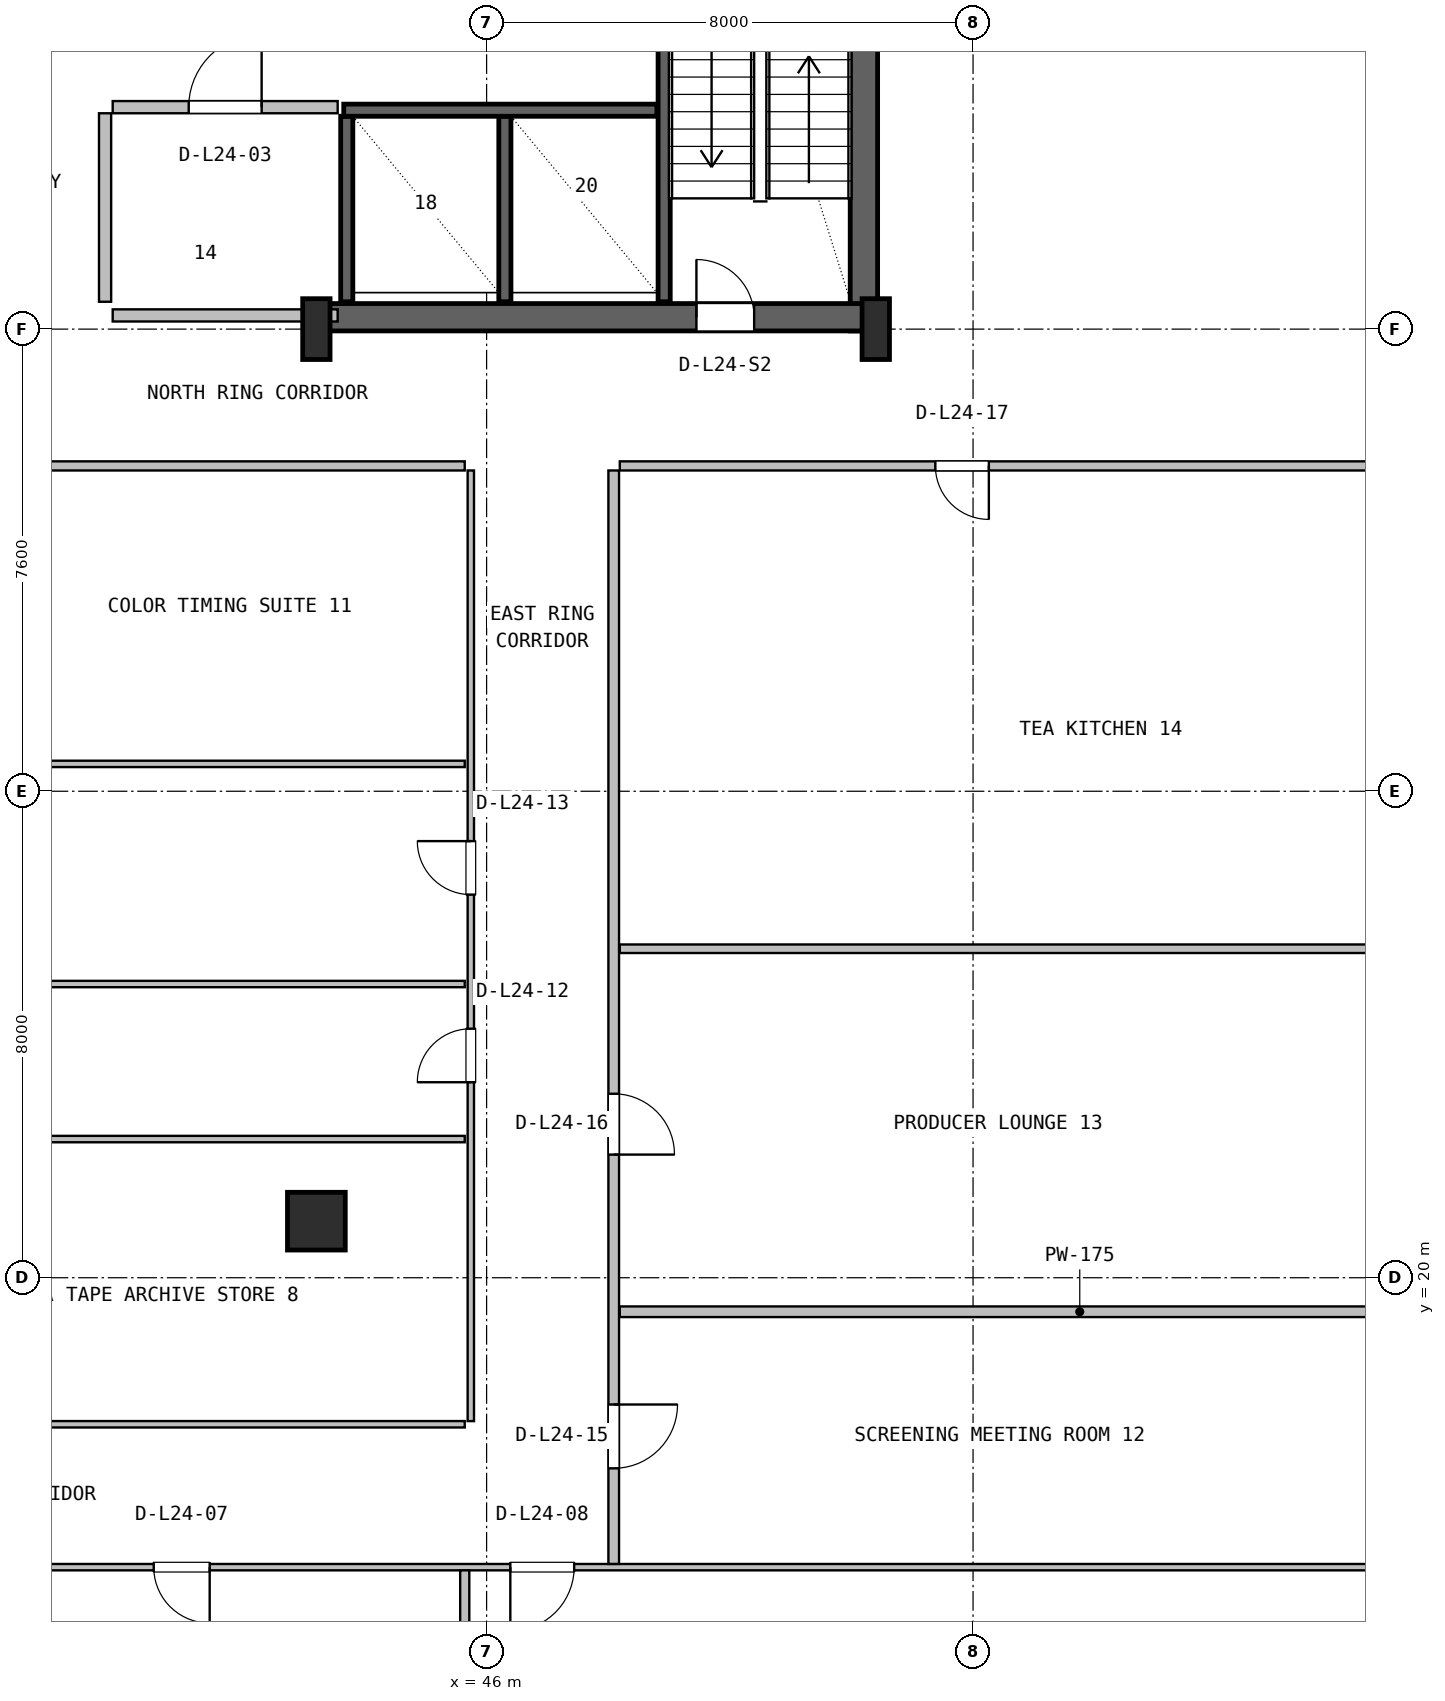
"""IFC4 building model, lengths in metres.
Left out: names, types, materials, properties, quantities, classifications, styles, units other than length and angle.
Written with IfcOpenShell. Run it as: python <this file> out.ifc"""

import sys

from ifc_helpers import new_model, si_unit, direction, frame, frame_2d, origin, origin_2d, place, context, subcontext, project, spatial, rectangle, i_section, extrude, source, transform, mapped, element, fill, save


model = new_model("IFC4")
c1 = context("Model", 3, precision=1e-05, world=origin(), true_north=direction((0.0, 1.0)))
c2 = subcontext(c1, "Body", "Model", "MODEL_VIEW")
j1 = project(units=[si_unit("LENGTHUNIT", "METRE"), si_unit("PLANEANGLEUNIT", "RADIAN")], contexts=[c1])
p1 = place(None, origin())
s1 = spatial("IfcSite", under=j1, at=p1, CompositionType="ELEMENT")
p2 = place(p1, origin())
s2 = spatial("IfcBuilding", under=s1, at=p2, CompositionType="ELEMENT")
p3 = place(p2, frame((0.0, 0.0, 103.0)))
s3 = spatial("IfcBuildingStorey", under=s2, at=p3, CompositionType="ELEMENT", Elevation=103.0)
p4 = place(p3, frame((52.205, 35.57, 0.0), z_axis=(0.0, 0.0, 1.0), x_axis=(0.0, 1.0, 0.0)))
e1 = element("IfcWall", 1, at=p4, inside=s3, PredefinedType="SHEAR", context=c2, shape_type="SweptSolid", body=[
    extrude(rectangle(XDim=11.23, YDim=0.45, at=frame_2d((5.615, 0.0))), origin(), (0.0, 0.0, 1.0), 3.55),
])
p5 = place(p3, frame((43.2, 35.795, 0.0), z_axis=(0.0, 0.0, 1.0), x_axis=(1.0, 0.0, 0.0)))
e2 = element("IfcWall", 2, at=p5, inside=s3, PredefinedType="SHEAR", context=c2, shape_type="SweptSolid", body=[
    extrude(rectangle(XDim=9.23, YDim=0.45, at=frame_2d((4.615, 0.0))), origin(), (0.0, 0.0, 1.0), 3.55),
])
p6 = place(p5, frame((6.25, 0.0, 0.0)))
e3 = element("IfcOpeningElement", 3, at=p6, cuts=e2, PredefinedType="OPENING", context=c2, shape_type="SweptSolid", body=[
    extrude(rectangle(XDim=0.95, YDim=2.1, at=frame_2d((0.475, 1.05))), frame((0.0, 0.235, 0.0), z_axis=(0.0, -1.0, 0.0), x_axis=(1.0, 0.0, 0.0)), (0.0, 0.0, 1.0), 0.47),
])
m1 = source(origin(), c2, "Body", "SweptSolid", [
    extrude(i_section(OverallWidth=0.45, OverallDepth=1.0, WebThickness=0.016, FlangeThickness=0.03, FilletRadius=0.016, at=origin_2d()), origin(), (0.0, 0.0, 1.0), 3.8),
])
for number, where, z_axis, x_axis in (
    (4, (43.2, 35.6, 0.0), (0.0, 0.0, 1.0), (1.0, 0.0, 0.0)),
    (5, (52.4, 35.6, 0.0), (0.0, 0.0, 1.0), (1.0, 0.0, 0.0)),
):
    element("IfcColumn", number, at=place(p3, frame(where, z_axis=z_axis, x_axis=x_axis)), inside=s3, PredefinedType="COLUMN", context=c2, shape_type="MappedRepresentation", body=[
        mapped(m1, transform((0.0, 0.0, 0.0), x_axis=(1.0, 0.0, 0.0), y_axis=(0.0, 1.0, 0.0), z_axis=(0.0, 0.0, 1.0), scale=1.0)),
    ])
m2 = source(origin(), c2, "Body", "SweptSolid", [
    extrude(rectangle(XDim=0.95, YDim=0.95, at=origin_2d()), origin(), (0.0, 0.0, 1.0), 3.8),
])
p7 = place(p3, frame((43.2, 20.93, 0.0), z_axis=(0.0, 0.0, 1.0), x_axis=(1.0, 0.0, 0.0)))
e6 = element("IfcColumn", 6, at=p7, inside=s3, PredefinedType="COLUMN", context=c2, shape_type="MappedRepresentation", body=[
    mapped(m2, transform((0.0, 0.0, 0.0), x_axis=(1.0, 0.0, 0.0), y_axis=(0.0, 1.0, 0.0), z_axis=(0.0, 0.0, 1.0), scale=1.0)),
])
p8 = place(p3, frame((48.92, 36.05, 0.0), z_axis=(0.0, 0.0, 1.0), x_axis=(0.0, 1.0, 0.0)))
e7 = element("IfcWall", 7, at=p8, inside=s3, PredefinedType="SHEAR", context=c2, shape_type="SweptSolid", body=[
    extrude(rectangle(XDim=10.5, YDim=0.2, at=frame_2d((5.25, 0.0))), origin(), (0.0, 0.0, 1.0), 3.55),
])
for number, where, z_axis, x_axis in (
    (8, (43.7, 36.05, 0.0), (0.0, 0.0, 1.0), (0.0, 1.0, 0.0)),
    (9, (46.3, 36.05, 0.0), (0.0, 0.0, 1.0), (0.0, 1.0, 0.0)),
):
    element("IfcWall", number, at=place(p3, frame(where, z_axis=z_axis, x_axis=x_axis)), inside=s3, PredefinedType="SHEAR", context=c2, shape_type="SweptSolid", body=[
        extrude(rectangle(XDim=3.05, YDim=0.2, at=frame_2d((1.525, 0.0))), origin(), (0.0, 0.0, 1.0), 3.55),
    ])
p9 = place(p3, frame((43.65, 39.2, 0.0), z_axis=(0.0, 0.0, 1.0), x_axis=(1.0, 0.0, 0.0)))
e10 = element("IfcWall", 10, at=p9, inside=s3, PredefinedType="SHEAR", context=c2, shape_type="SweptSolid", body=[
    extrude(rectangle(XDim=5.15, YDim=0.2, at=frame_2d((2.575, 0.0))), origin(), (0.0, 0.0, 1.0), 3.55),
])
p10 = place(p3, frame((39.85, 35.825, 0.0), z_axis=(0.0, 0.0, 1.0), x_axis=(1.0, 0.0, 0.0)))
e11 = element("IfcWall", 11, at=p10, inside=s3, PredefinedType="SOLIDWALL", context=c2, shape_type="SweptSolid", body=[
    extrude(rectangle(XDim=3.7, YDim=0.2, at=frame_2d((1.85, 0.0))), origin(), (0.0, 0.0, 1.0), 2.325),
])
p11 = place(p3, frame((39.85, 39.25, 0.0), z_axis=(0.0, 0.0, 1.0), x_axis=(1.0, 0.0, 0.0)))
e12 = element("IfcWall", 12, at=p11, inside=s3, PredefinedType="SOLIDWALL", context=c2, shape_type="SweptSolid", body=[
    extrude(rectangle(XDim=3.7, YDim=0.2, at=frame_2d((1.85, 0.0))), origin(), (0.0, 0.0, 1.0), 3.53),
])
p12 = place(p11, frame((1.25, 0.0, 0.0)))
e13 = element("IfcOpeningElement", 13, at=p12, cuts=e12, PredefinedType="OPENING", context=c2, shape_type="SweptSolid", body=[
    extrude(rectangle(XDim=1.2, YDim=2.1, at=frame_2d((0.6, 1.05))), frame((0.0, 0.11, 0.0), z_axis=(0.0, -1.0, 0.0), x_axis=(1.0, 0.0, 0.0)), (0.0, 0.0, 1.0), 0.22),
])
p13 = place(p3, frame((39.725, 36.05, 0.0), z_axis=(0.0, 0.0, 1.0), x_axis=(0.0, 1.0, 0.0)))
e14 = element("IfcWall", 14, at=p13, inside=s3, PredefinedType="SOLIDWALL", context=c2, shape_type="SweptSolid", body=[
    extrude(rectangle(XDim=3.1, YDim=0.2, at=frame_2d((1.55, 0.0))), origin(), (0.0, 0.0, 1.0), 3.53),
])
p14 = place(p3, frame((4.68, 15.24, 0.0), z_axis=(0.0, 0.0, 1.0), x_axis=(1.0, 0.0, 0.0)))
e15 = element("IfcWall", 15, at=p14, inside=s3, PredefinedType="PARTITIONING", context=c2, shape_type="SweptSolid", body=[
    extrude(rectangle(XDim=58.64, YDim=0.105, at=frame_2d((29.32, 0.0))), origin(), (0.0, 0.0, 1.0), 2.83),
])
p15 = place(p14, frame((17.105, 0.0, 0.0)))
e16 = element("IfcOpeningElement", 16, at=p15, cuts=e15, PredefinedType="OPENING", context=c2, shape_type="SweptSolid", body=[
    extrude(rectangle(XDim=0.88, YDim=2.06, at=frame_2d((0.44, 1.03))), frame((0.0, 0.062, 0.0), z_axis=(0.0, -1.0, 0.0), x_axis=(1.0, 0.0, 0.0)), (0.0, 0.0, 1.0), 0.125),
])
p16 = place(p14, frame((21.005, 0.0, 0.0)))
e17 = element("IfcOpeningElement", 17, at=p16, cuts=e15, PredefinedType="OPENING", context=c2, shape_type="SweptSolid", body=[
    extrude(rectangle(XDim=0.88, YDim=2.06, at=frame_2d((0.44, 1.03))), frame((0.0, 0.062, 0.0), z_axis=(0.0, -1.0, 0.0), x_axis=(1.0, 0.0, 0.0)), (0.0, 0.0, 1.0), 0.125),
])
p17 = place(p14, frame((27.42, 0.0, 0.0)))
e18 = element("IfcOpeningElement", 18, at=p17, cuts=e15, PredefinedType="OPENING", context=c2, shape_type="SweptSolid", body=[
    extrude(rectangle(XDim=0.88, YDim=2.06, at=frame_2d((0.44, 1.03))), frame((0.0, 0.062, 0.0), z_axis=(0.0, -1.0, 0.0), x_axis=(1.0, 0.0, 0.0)), (0.0, 0.0, 1.0), 0.125),
])
p18 = place(p14, frame((35.845, 0.0, 0.0)))
e19 = element("IfcOpeningElement", 19, at=p18, cuts=e15, PredefinedType="OPENING", context=c2, shape_type="SweptSolid", body=[
    extrude(rectangle(XDim=0.92, YDim=2.08, at=frame_2d((0.46, 1.04))), frame((0.0, 0.062, 0.0), z_axis=(0.0, -1.0, 0.0), x_axis=(1.0, 0.0, 0.0)), (0.0, 0.0, 1.0), 0.125),
])
p19 = place(p14, frame((41.71, 0.0, 0.0)))
e20 = element("IfcOpeningElement", 20, at=p19, cuts=e15, PredefinedType="OPENING", context=c2, shape_type="SweptSolid", body=[
    extrude(rectangle(XDim=1.05, YDim=2.1, at=frame_2d((0.525, 1.05))), frame((0.0, 0.062, 0.0), z_axis=(0.0, -1.0, 0.0), x_axis=(1.0, 0.0, 0.0)), (0.0, 0.0, 1.0), 0.125),
])
p20 = place(p3, frame((45.64, 4.38, 0.0), z_axis=(0.0, 0.0, 1.0), x_axis=(0.0, 1.0, 0.0)))
e21 = element("IfcWall", 21, at=p20, inside=s3, PredefinedType="PARTITIONING", context=c2, shape_type="SweptSolid", body=[
    extrude(rectangle(XDim=10.808, YDim=0.15, at=frame_2d((5.404, 0.0))), origin(), (0.0, 0.0, 1.0), 3.108),
])
p21 = place(p3, frame((23.5, 17.59, 0.0), z_axis=(0.0, 0.0, 1.0), x_axis=(1.0, 0.0, 0.0)))
e22 = element("IfcWall", 22, at=p21, inside=s3, PredefinedType="PARTITIONING", context=c2, shape_type="SweptSolid", body=[
    extrude(rectangle(XDim=22.14, YDim=0.105, at=frame_2d((11.07, 0.0))), origin(), (0.0, 0.0, 1.0), 2.83),
])
p22 = place(p21, frame((10.63, 0.0, 0.0)))
e23 = element("IfcOpeningElement", 23, at=p22, cuts=e22, PredefinedType="OPENING", context=c2, shape_type="SweptSolid", body=[
    extrude(rectangle(XDim=0.88, YDim=2.06, at=frame_2d((0.44, 1.03))), frame((0.0, 0.062, 0.0), z_axis=(0.0, -1.0, 0.0), x_axis=(1.0, 0.0, 0.0)), (0.0, 0.0, 1.0), 0.125),
])
p23 = place(p3, frame((45.74, 17.642, 0.0), z_axis=(0.0, 0.0, 1.0), x_axis=(0.0, 1.0, 0.0)))
e24 = element("IfcWall", 24, at=p23, inside=s3, PredefinedType="PARTITIONING", context=c2, shape_type="SweptSolid", body=[
    extrude(rectangle(XDim=15.633, YDim=0.105, at=frame_2d((7.816, 0.0))), origin(), (0.0, 0.0, 1.0), 3.222),
])
p24 = place(p23, frame((5.573, 0.0, 0.0)))
e25 = element("IfcOpeningElement", 25, at=p24, cuts=e24, PredefinedType="OPENING", context=c2, shape_type="SweptSolid", body=[
    extrude(rectangle(XDim=0.88, YDim=2.06, at=frame_2d((0.44, 1.03))), frame((0.0, 0.062, 0.0), z_axis=(0.0, -1.0, 0.0), x_axis=(1.0, 0.0, 0.0)), (0.0, 0.0, 1.0), 0.125),
])
p25 = place(p23, frame((8.658, 0.0, 0.0)))
e26 = element("IfcOpeningElement", 26, at=p25, cuts=e24, PredefinedType="OPENING", context=c2, shape_type="SweptSolid", body=[
    extrude(rectangle(XDim=0.88, YDim=2.06, at=frame_2d((0.44, 1.03))), frame((0.0, 0.062, 0.0), z_axis=(0.0, -1.0, 0.0), x_axis=(1.0, 0.0, 0.0)), (0.0, 0.0, 1.0), 0.125),
])
for number, where, z_axis, x_axis in (
    (27, (23.5, 22.28, 0.0), (0.0, 0.0, 1.0), (1.0, 0.0, 0.0)),
    (28, (23.5, 24.83, 0.0), (0.0, 0.0, 1.0), (1.0, 0.0, 0.0)),
    (29, (23.5, 28.45, 0.0), (0.0, 0.0, 1.0), (1.0, 0.0, 0.0)),
):
    element("IfcWall", number, at=place(p3, frame(where, z_axis=z_axis, x_axis=x_axis)), inside=s3, PredefinedType="PARTITIONING", context=c2, shape_type="SweptSolid", body=[
        extrude(rectangle(XDim=22.14, YDim=0.105, at=frame_2d((11.07, 0.0))), origin(), (0.0, 0.0, 1.0), 2.83),
    ])
p26 = place(p3, frame((23.5, 33.35, 0.0), z_axis=(0.0, 0.0, 1.0), x_axis=(1.0, 0.0, 0.0)))
e30 = element("IfcWall", 30, at=p26, inside=s3, PredefinedType="PARTITIONING", context=c2, shape_type="SweptSolid", body=[
    extrude(rectangle(XDim=22.14, YDim=0.15, at=frame_2d((11.07, 0.0))), origin(), (0.0, 0.0, 1.0), 2.83),
])
p27 = place(p26, frame((10.61, 0.0, 0.0)))
e31 = element("IfcOpeningElement", 31, at=p27, cuts=e30, PredefinedType="OPENING", context=c2, shape_type="SweptSolid", body=[
    extrude(rectangle(XDim=0.92, YDim=2.08, at=frame_2d((0.46, 1.04))), frame((0.0, 0.085, 0.0), z_axis=(0.0, -1.0, 0.0), x_axis=(1.0, 0.0, 0.0)), (0.0, 0.0, 1.0), 0.17),
])
p28 = place(p3, frame((48.19, 19.44, 0.0), z_axis=(0.0, 0.0, 1.0), x_axis=(1.0, 0.0, 0.0)))
e32 = element("IfcWall", 32, at=p28, inside=s3, PredefinedType="PARTITIONING", context=c2, shape_type="SweptSolid", body=[
    extrude(rectangle(XDim=15.13, YDim=0.175, at=frame_2d((7.565, 0.0))), origin(), (0.0, 0.0, 1.0), 3.108),
])
p29 = place(p3, frame((48.09, 15.293, 0.0), z_axis=(0.0, 0.0, 1.0), x_axis=(0.0, 1.0, 0.0)))
e33 = element("IfcWall", 33, at=p29, inside=s3, PredefinedType="PARTITIONING", context=c2, shape_type="SweptSolid", body=[
    extrude(rectangle(XDim=17.982, YDim=0.175, at=frame_2d((8.991, 0.0))), origin(), (0.0, 0.0, 1.0), 3.222),
])
p30 = place(p29, frame((1.572, 0.0, 0.0)))
e34 = element("IfcOpeningElement", 34, at=p30, cuts=e33, PredefinedType="OPENING", context=c2, shape_type="SweptSolid", body=[
    extrude(rectangle(XDim=1.05, YDim=2.1, at=frame_2d((0.525, 1.05))), frame((0.0, 0.098, 0.0), z_axis=(0.0, -1.0, 0.0), x_axis=(1.0, 0.0, 0.0)), (0.0, 0.0, 1.0), 0.195),
])
p31 = place(p29, frame((6.732, 0.0, 0.0)))
e35 = element("IfcOpeningElement", 35, at=p31, cuts=e33, PredefinedType="OPENING", context=c2, shape_type="SweptSolid", body=[
    extrude(rectangle(XDim=1.0, YDim=2.1, at=frame_2d((0.5, 1.05))), frame((0.0, 0.098, 0.0), z_axis=(0.0, -1.0, 0.0), x_axis=(1.0, 0.0, 0.0)), (0.0, 0.0, 1.0), 0.195),
])
p32 = place(p3, frame((48.19, 25.41, 0.0), z_axis=(0.0, 0.0, 1.0), x_axis=(1.0, 0.0, 0.0)))
e36 = element("IfcWall", 36, at=p32, inside=s3, PredefinedType="PARTITIONING", context=c2, shape_type="SweptSolid", body=[
    extrude(rectangle(XDim=15.13, YDim=0.14, at=frame_2d((7.565, 0.0))), origin(), (0.0, 0.0, 1.0), 3.108),
])
p33 = place(p3, frame((48.19, 33.35, 0.0), z_axis=(0.0, 0.0, 1.0), x_axis=(1.0, 0.0, 0.0)))
e37 = element("IfcWall", 37, at=p33, inside=s3, PredefinedType="PARTITIONING", context=c2, shape_type="SweptSolid", body=[
    extrude(rectangle(XDim=15.13, YDim=0.15, at=frame_2d((7.565, 0.0))), origin(), (0.0, 0.0, 1.0), 3.108),
])
p34 = place(p33, frame((5.19, 0.0, 0.0)))
e38 = element("IfcOpeningElement", 38, at=p34, cuts=e37, PredefinedType="OPENING", context=c2, shape_type="SweptSolid", body=[
    extrude(rectangle(XDim=0.88, YDim=2.06, at=frame_2d((0.44, 1.03))), frame((0.0, 0.085, 0.0), z_axis=(0.0, -1.0, 0.0), x_axis=(1.0, 0.0, 0.0)), (0.0, 0.0, 1.0), 0.17),
])
m3 = source(origin(), c2, "Body", "SweptSolid", [
    extrude(rectangle(XDim=0.95, YDim=2.1, at=frame_2d((0.475, 1.05))), frame((0.0, 0.025, 0.0), z_axis=(0.0, -1.0, 0.0), x_axis=(1.0, 0.0, 0.0)), (0.0, 0.0, 1.0), 0.05),
])
p35 = place(p6, origin())
e39 = element("IfcDoor", 39, at=p35, inside=s3, OperationType="SINGLE_SWING_LEFT", PredefinedType="DOOR", context=c2, shape_type="MappedRepresentation", body=[
    mapped(m3, transform((0.0, 0.0, 0.0), x_axis=(1.0, 0.0, 0.0), y_axis=(0.0, 1.0, 0.0), z_axis=(0.0, 0.0, 1.0), scale=1.0)),
])
fill(e3, e39)
m4 = source(origin(), c2, "Body", "SweptSolid", [
    extrude(rectangle(XDim=1.2, YDim=2.1, at=frame_2d((0.6, 1.05))), frame((0.0, 0.025, 0.0), z_axis=(0.0, -1.0, 0.0), x_axis=(1.0, 0.0, 0.0)), (0.0, 0.0, 1.0), 0.05),
])
p36 = place(p12, origin())
e40 = element("IfcDoor", 40, at=p36, inside=s3, OperationType="SINGLE_SWING_RIGHT", PredefinedType="DOOR", context=c2, shape_type="MappedRepresentation", body=[
    mapped(m4, transform((0.0, 0.0, 0.0), x_axis=(1.0, 0.0, 0.0), y_axis=(0.0, 1.0, 0.0), z_axis=(0.0, 0.0, 1.0), scale=1.0)),
])
fill(e13, e40)
m5 = source(origin(), c2, "Body", "SweptSolid", [
    extrude(rectangle(XDim=0.92, YDim=2.08, at=frame_2d((0.46, 1.04))), frame((0.0, 0.025, 0.0), z_axis=(0.0, -1.0, 0.0), x_axis=(1.0, 0.0, 0.0)), (0.0, 0.0, 1.0), 0.05),
])
p37 = place(p18, frame((0.92, 0.0, 0.0), z_axis=(0.0, 0.0, 1.0), x_axis=(-1.0, 0.0, 0.0)))
e41 = element("IfcDoor", 41, at=p37, inside=s3, OperationType="SINGLE_SWING_RIGHT", PredefinedType="DOOR", context=c2, shape_type="MappedRepresentation", body=[
    mapped(m5, transform((0.0, 0.0, 0.0), x_axis=(1.0, 0.0, 0.0), y_axis=(0.0, 1.0, 0.0), z_axis=(0.0, 0.0, 1.0), scale=1.0)),
])
fill(e19, e41)
m6 = source(origin(), c2, "Body", "SweptSolid", [
    extrude(rectangle(XDim=1.05, YDim=2.1, at=frame_2d((0.525, 1.05))), frame((0.0, 0.025, 0.0), z_axis=(0.0, -1.0, 0.0), x_axis=(1.0, 0.0, 0.0)), (0.0, 0.0, 1.0), 0.05),
])
p38 = place(p19, frame((1.05, 0.0, 0.0), z_axis=(0.0, 0.0, 1.0), x_axis=(-1.0, 0.0, 0.0)))
e42 = element("IfcDoor", 42, at=p38, inside=s3, OperationType="SINGLE_SWING_LEFT", PredefinedType="DOOR", context=c2, shape_type="MappedRepresentation", body=[
    mapped(m6, transform((0.0, 0.0, 0.0), x_axis=(1.0, 0.0, 0.0), y_axis=(0.0, 1.0, 0.0), z_axis=(0.0, 0.0, 1.0), scale=1.0)),
])
fill(e20, e42)
m7 = source(origin(), c2, "Body", "SweptSolid", [
    extrude(rectangle(XDim=0.88, YDim=2.06, at=frame_2d((0.44, 1.03))), frame((0.0, 0.025, 0.0), z_axis=(0.0, -1.0, 0.0), x_axis=(1.0, 0.0, 0.0)), (0.0, 0.0, 1.0), 0.05),
])
p39 = place(p24, origin())
e43 = element("IfcDoor", 43, at=p39, inside=s3, OperationType="SINGLE_SWING_LEFT", PredefinedType="DOOR", context=c2, shape_type="MappedRepresentation", body=[
    mapped(m7, transform((0.0, 0.0, 0.0), x_axis=(1.0, 0.0, 0.0), y_axis=(0.0, 1.0, 0.0), z_axis=(0.0, 0.0, 1.0), scale=1.0)),
])
fill(e25, e43)
p40 = place(p25, origin())
e44 = element("IfcDoor", 44, at=p40, inside=s3, OperationType="SINGLE_SWING_RIGHT", PredefinedType="DOOR", context=c2, shape_type="MappedRepresentation", body=[
    mapped(m7, transform((0.0, 0.0, 0.0), x_axis=(1.0, 0.0, 0.0), y_axis=(0.0, 1.0, 0.0), z_axis=(0.0, 0.0, 1.0), scale=1.0)),
])
fill(e26, e44)
p41 = place(p30, frame((1.05, 0.0, 0.0), z_axis=(0.0, 0.0, 1.0), x_axis=(-1.0, 0.0, 0.0)))
e45 = element("IfcDoor", 45, at=p41, inside=s3, OperationType="SINGLE_SWING_RIGHT", PredefinedType="DOOR", context=c2, shape_type="MappedRepresentation", body=[
    mapped(m6, transform((0.0, 0.0, 0.0), x_axis=(1.0, 0.0, 0.0), y_axis=(0.0, 1.0, 0.0), z_axis=(0.0, 0.0, 1.0), scale=1.0)),
])
fill(e34, e45)
m8 = source(origin(), c2, "Body", "SweptSolid", [
    extrude(rectangle(XDim=1.0, YDim=2.1, at=frame_2d((0.5, 1.05))), frame((0.0, 0.025, 0.0), z_axis=(0.0, -1.0, 0.0), x_axis=(1.0, 0.0, 0.0)), (0.0, 0.0, 1.0), 0.05),
])
p42 = place(p31, frame((1.0, 0.0, 0.0), z_axis=(0.0, 0.0, 1.0), x_axis=(-1.0, 0.0, 0.0)))
e46 = element("IfcDoor", 46, at=p42, inside=s3, OperationType="SINGLE_SWING_LEFT", PredefinedType="DOOR", context=c2, shape_type="MappedRepresentation", body=[
    mapped(m8, transform((0.0, 0.0, 0.0), x_axis=(1.0, 0.0, 0.0), y_axis=(0.0, 1.0, 0.0), z_axis=(0.0, 0.0, 1.0), scale=1.0)),
])
fill(e35, e46)
p43 = place(p34, frame((0.88, 0.0, 0.0), z_axis=(0.0, 0.0, 1.0), x_axis=(-1.0, 0.0, 0.0)))
e47 = element("IfcDoor", 47, at=p43, inside=s3, OperationType="SINGLE_SWING_RIGHT", PredefinedType="DOOR", context=c2, shape_type="MappedRepresentation", body=[
    mapped(m7, transform((0.0, 0.0, 0.0), x_axis=(1.0, 0.0, 0.0), y_axis=(0.0, 1.0, 0.0), z_axis=(0.0, 0.0, 1.0), scale=1.0)),
])
fill(e38, e47)
save(model, sys.argv[1])
